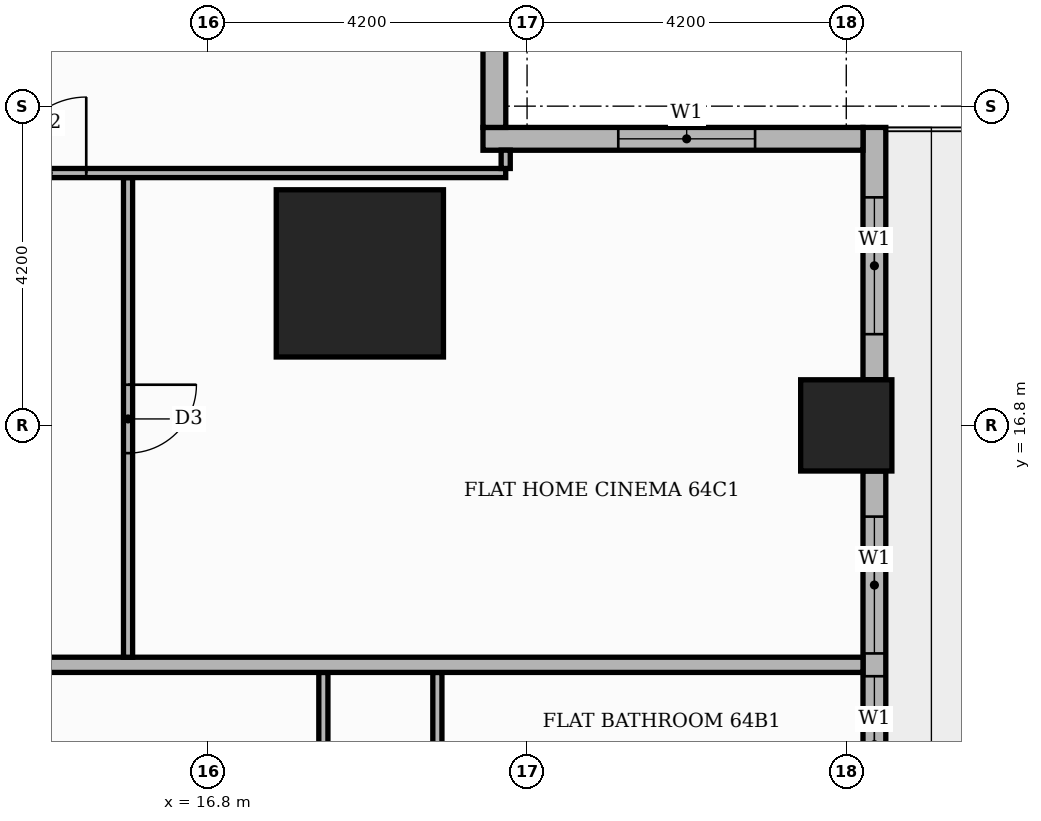
"""IFC4 building model, lengths in metres.
Left out: names, types, materials, properties, quantities, classifications, styles, units other than length and angle.
Written with IfcOpenShell. Run it as: python <this file> out.ifc"""

import sys

from ifc_helpers import new_model, si_unit, direction, frame, frame_2d, origin, origin_2d, place, context, subcontext, project, spatial, rectangle, extrude, element, fill, save


model = new_model("IFC4")
c1 = context("Model", 3, precision=1e-05, world=origin(), true_north=direction((0.0, 1.0)))
c2 = subcontext(c1, "Body", "Model", "MODEL_VIEW")
j1 = project(units=[si_unit("LENGTHUNIT", "METRE"), si_unit("PLANEANGLEUNIT", "RADIAN")], contexts=[c1])
p1 = place(None, origin())
s1 = spatial("IfcSite", under=j1, at=p1, CompositionType="ELEMENT")
p2 = place(p1, origin())
s2 = spatial("IfcBuilding", under=s1, at=p2, CompositionType="ELEMENT")
p3 = place(p2, frame((0.0, 0.0, 267.9)))
s3 = spatial("IfcBuildingStorey", under=s2, at=p3, CompositionType="ELEMENT", Elevation=267.9)
p4 = place(p3, frame((18.8, 18.8, 0.0), z_axis=(0.0, 0.0, 1.0), x_axis=(1.0, 0.0, 0.0)))
e1 = element("IfcColumn", 1, at=p4, inside=s3, PredefinedType="COLUMN", context=c2, shape_type="SweptSolid", body=[
    extrude(rectangle(XDim=2.2, YDim=2.2, at=origin_2d()), origin(), (0.0, 0.0, 1.0), 3.9),
])
p5 = place(p3, frame((25.2, 16.8, 0.0), z_axis=(0.0, 0.0, 1.0), x_axis=(1.0, 0.0, 0.0)))
e2 = element("IfcColumn", 2, at=p5, inside=s3, PredefinedType="COLUMN", context=c2, shape_type="SweptSolid", body=[
    extrude(rectangle(XDim=1.2, YDim=1.2, at=origin_2d()), origin(), (0.0, 0.0, 1.0), 3.9),
])
p6 = place(p3, frame((25.57, 9.0, 0.0), z_axis=(0.0, 0.0, 1.0), x_axis=(0.0, 1.0, 0.0)))
e3 = element("IfcWall", 3, at=p6, inside=s3, PredefinedType="STANDARD", context=c2, shape_type="SweptSolid", body=[
    extrude(rectangle(XDim=7.2, YDim=0.3, at=frame_2d((3.6, 0.0))), origin(), (0.0, 0.0, 1.0), 3.48),
])
p7 = place(p6, frame((0.6, 0.0, 0.9)))
e4 = element("IfcOpeningElement", 4, at=p7, cuts=e3, PredefinedType="OPENING", context=c2, shape_type="SweptSolid", body=[
    extrude(rectangle(XDim=1.8, YDim=2.1, at=frame_2d((0.9, 1.05))), frame((0.0, 0.16, 0.0), z_axis=(0.0, -1.0, 0.0), x_axis=(1.0, 0.0, 0.0)), (0.0, 0.0, 1.0), 0.32),
])
p8 = place(p6, frame((2.7, 0.0, 0.9)))
e5 = element("IfcOpeningElement", 5, at=p8, cuts=e3, PredefinedType="OPENING", context=c2, shape_type="SweptSolid", body=[
    extrude(rectangle(XDim=1.8, YDim=2.1, at=frame_2d((0.9, 1.05))), frame((0.0, 0.16, 0.0), z_axis=(0.0, -1.0, 0.0), x_axis=(1.0, 0.0, 0.0)), (0.0, 0.0, 1.0), 0.32),
])
p9 = place(p6, frame((4.8, 0.0, 0.9)))
e6 = element("IfcOpeningElement", 6, at=p9, cuts=e3, PredefinedType="OPENING", context=c2, shape_type="SweptSolid", body=[
    extrude(rectangle(XDim=1.8, YDim=2.1, at=frame_2d((0.9, 1.05))), frame((0.0, 0.16, 0.0), z_axis=(0.0, -1.0, 0.0), x_axis=(1.0, 0.0, 0.0)), (0.0, 0.0, 1.0), 0.32),
])
p10 = place(p3, frame((25.57, 17.4, 0.0), z_axis=(0.0, 0.0, 1.0), x_axis=(0.0, 1.0, 0.0)))
e7 = element("IfcWall", 7, at=p10, inside=s3, PredefinedType="STANDARD", context=c2, shape_type="SweptSolid", body=[
    extrude(rectangle(XDim=3.32, YDim=0.3, at=frame_2d((1.66, 0.0))), origin(), (0.0, 0.0, 1.0), 3.48),
])
p11 = place(p10, frame((0.6, 0.0, 0.9)))
e8 = element("IfcOpeningElement", 8, at=p11, cuts=e7, PredefinedType="OPENING", context=c2, shape_type="SweptSolid", body=[
    extrude(rectangle(XDim=1.8, YDim=2.1, at=frame_2d((0.9, 1.05))), frame((0.0, 0.16, 0.0), z_axis=(0.0, -1.0, 0.0), x_axis=(1.0, 0.0, 0.0)), (0.0, 0.0, 1.0), 0.32),
])
p12 = place(p3, frame((25.42, 20.57, 0.0), z_axis=(0.0, 0.0, 1.0), x_axis=(-1.0, 0.0, 0.0)))
e9 = element("IfcWall", 9, at=p12, inside=s3, PredefinedType="STANDARD", context=c2, shape_type="SweptSolid", body=[
    extrude(rectangle(XDim=5.0, YDim=0.3, at=frame_2d((2.5, 0.0))), origin(), (0.0, 0.0, 1.0), 3.48),
])
p13 = place(p12, frame((1.42, 0.0, 0.9)))
e10 = element("IfcOpeningElement", 10, at=p13, cuts=e9, PredefinedType="OPENING", context=c2, shape_type="SweptSolid", body=[
    extrude(rectangle(XDim=1.8, YDim=2.1, at=frame_2d((0.9, 1.05))), frame((0.0, 0.16, 0.0), z_axis=(0.0, -1.0, 0.0), x_axis=(1.0, 0.0, 0.0)), (0.0, 0.0, 1.0), 0.32),
])
p14 = place(p3, frame((20.57, 20.72, 0.0), z_axis=(0.0, 0.0, 1.0), x_axis=(0.0, 1.0, 0.0)))
e11 = element("IfcWall", 11, at=p14, inside=s3, PredefinedType="STANDARD", context=c2, shape_type="SweptSolid", body=[
    extrude(rectangle(XDim=5.0, YDim=0.3, at=frame_2d((2.5, 0.0))), origin(), (0.0, 0.0, 1.0), 3.48),
])
p15 = place(p14, frame((1.48, 0.0, 0.9)))
e12 = element("IfcOpeningElement", 12, at=p15, cuts=e11, PredefinedType="OPENING", context=c2, shape_type="SweptSolid", body=[
    extrude(rectangle(XDim=1.8, YDim=2.1, at=frame_2d((0.9, 1.05))), frame((0.0, 0.16, 0.0), z_axis=(0.0, -1.0, 0.0), x_axis=(1.0, 0.0, 0.0)), (0.0, 0.0, 1.0), 0.32),
])
p16 = place(p3, frame((18.32, 9.66, 0.0), z_axis=(0.0, 0.0, 1.0), x_axis=(0.0, 1.0, 0.0)))
e13 = element("IfcWall", 13, at=p16, inside=s3, PredefinedType="PARTITIONING", context=c2, shape_type="SweptSolid", body=[
    extrude(rectangle(XDim=3.89, YDim=0.12, at=frame_2d((1.945, 0.0))), origin(), (0.0, 0.0, 1.0), 3.48),
])
p17 = place(p16, frame((1.515, 0.0, 0.0)))
e14 = element("IfcOpeningElement", 14, at=p17, cuts=e13, PredefinedType="OPENING", context=c2, shape_type="SweptSolid", body=[
    extrude(rectangle(XDim=0.9, YDim=2.1, at=frame_2d((0.45, 1.05))), frame((0.0, 0.07, 0.0), z_axis=(0.0, -1.0, 0.0), x_axis=(1.0, 0.0, 0.0)), (0.0, 0.0, 1.0), 0.14),
])
p18 = place(p3, frame((19.82, 11.61, 0.0), z_axis=(0.0, 0.0, 1.0), x_axis=(0.0, 1.0, 0.0)))
e15 = element("IfcWall", 15, at=p18, inside=s3, PredefinedType="PARTITIONING", context=c2, shape_type="SweptSolid", body=[
    extrude(rectangle(XDim=1.94, YDim=0.12, at=frame_2d((0.97, 0.0))), origin(), (0.0, 0.0, 1.0), 3.48),
])
p19 = place(p3, frame((-13.65, 13.65, 0.0), z_axis=(0.0, 0.0, 1.0), x_axis=(1.0, 0.0, 0.0)))
e16 = element("IfcWall", 16, at=p19, inside=s3, PredefinedType="PARTITIONING", context=c2, shape_type="SweptSolid", body=[
    extrude(rectangle(XDim=39.07, YDim=0.2, at=frame_2d((19.535, 0.0))), origin(), (0.0, 0.0, 1.0), 3.48),
])
p20 = place(p19, frame((24.65, 0.0, 0.0)))
e17 = element("IfcOpeningElement", 17, at=p20, cuts=e16, PredefinedType="OPENING", context=c2, shape_type="SweptSolid", body=[
    extrude(rectangle(XDim=1.1, YDim=2.4, at=frame_2d((0.55, 1.2))), frame((0.0, 0.11, 0.0), z_axis=(0.0, -1.0, 0.0), x_axis=(1.0, 0.0, 0.0)), (0.0, 0.0, 1.0), 0.22),
])
p21 = place(p3, frame((15.75, 13.75, 0.0), z_axis=(0.0, 0.0, 1.0), x_axis=(0.0, 1.0, 0.0)))
e18 = element("IfcWall", 18, at=p21, inside=s3, PredefinedType="PARTITIONING", context=c2, shape_type="SweptSolid", body=[
    extrude(rectangle(XDim=6.31, YDim=0.12, at=frame_2d((3.155, 0.0))), origin(), (0.0, 0.0, 1.0), 3.48),
])
p22 = place(p21, frame((2.685, 0.0, 0.0)))
e19 = element("IfcOpeningElement", 19, at=p22, cuts=e18, PredefinedType="OPENING", context=c2, shape_type="SweptSolid", body=[
    extrude(rectangle(XDim=0.9, YDim=2.1, at=frame_2d((0.45, 1.05))), frame((0.0, 0.07, 0.0), z_axis=(0.0, -1.0, 0.0), x_axis=(1.0, 0.0, 0.0)), (0.0, 0.0, 1.0), 0.14),
])
p23 = place(p3, frame((-13.55, 20.12, 0.0), z_axis=(0.0, 0.0, 1.0), x_axis=(1.0, 0.0, 0.0)))
e20 = element("IfcWall", 20, at=p23, inside=s3, PredefinedType="PARTITIONING", context=c2, shape_type="SweptSolid", body=[
    extrude(rectangle(XDim=34.269, YDim=0.12, at=frame_2d((17.135, 0.0))), origin(), (0.0, 0.0, 1.0), 3.48),
])
p24 = place(p23, frame((27.75, 0.0, 0.0)))
e21 = element("IfcOpeningElement", 21, at=p24, cuts=e20, PredefinedType="OPENING", context=c2, shape_type="SweptSolid", body=[
    extrude(rectangle(XDim=1.0, YDim=2.1, at=frame_2d((0.5, 1.05))), frame((0.0, 0.07, 0.0), z_axis=(0.0, -1.0, 0.0), x_axis=(1.0, 0.0, 0.0)), (0.0, 0.0, 1.0), 0.14),
])
p25 = place(p23, frame((22.5, 0.0, 0.0)))
e22 = element("IfcOpeningElement", 22, at=p25, cuts=e20, PredefinedType="OPENING", context=c2, shape_type="SweptSolid", body=[
    extrude(rectangle(XDim=1.0, YDim=2.1, at=frame_2d((0.5, 1.05))), frame((0.0, 0.07, 0.0), z_axis=(0.0, -1.0, 0.0), x_axis=(1.0, 0.0, 0.0)), (0.0, 0.0, 1.0), 0.14),
])
p26 = place(p23, frame((14.15, 0.0, 0.0)))
e23 = element("IfcOpeningElement", 23, at=p26, cuts=e20, PredefinedType="OPENING", context=c2, shape_type="SweptSolid", body=[
    extrude(rectangle(XDim=0.9, YDim=2.1, at=frame_2d((0.45, 1.05))), frame((0.0, 0.07, 0.0), z_axis=(0.0, -1.0, 0.0), x_axis=(1.0, 0.0, 0.0)), (0.0, 0.0, 1.0), 0.14),
])
p27 = place(p23, frame((3.65, 0.0, 0.0)))
e24 = element("IfcOpeningElement", 24, at=p27, cuts=e20, PredefinedType="OPENING", context=c2, shape_type="SweptSolid", body=[
    extrude(rectangle(XDim=0.9, YDim=2.1, at=frame_2d((0.45, 1.05))), frame((0.0, 0.07, 0.0), z_axis=(0.0, -1.0, 0.0), x_axis=(1.0, 0.0, 0.0)), (0.0, 0.0, 1.0), 0.14),
])
p28 = place(p3, frame((20.719, 20.18, 0.0), z_axis=(0.0, 0.0, 1.0), x_axis=(0.0, 1.0, 0.0)))
e25 = element("IfcWall", 25, at=p28, inside=s3, PredefinedType="PARTITIONING", context=c2, shape_type="SweptSolid", body=[
    extrude(rectangle(XDim=0.241, YDim=0.12, at=frame_2d((0.121, 0.0))), origin(), (0.0, 0.0, 1.0), 3.48),
])
p29 = place(p8, origin())
e26 = element("IfcWindow", 26, at=p29, inside=s3, PartitioningType="SINGLE_PANEL", PredefinedType="WINDOW", context=c2, shape_type="SweptSolid", body=[
    extrude(rectangle(XDim=1.8, YDim=2.1, at=frame_2d((0.9, 1.05))), frame((0.0, 0.03, 0.0), z_axis=(0.0, -1.0, 0.0), x_axis=(1.0, 0.0, 0.0)), (0.0, 0.0, 1.0), 0.06),
])
fill(e5, e26)
p30 = place(p9, origin())
e27 = element("IfcWindow", 27, at=p30, inside=s3, PartitioningType="SINGLE_PANEL", PredefinedType="WINDOW", context=c2, shape_type="SweptSolid", body=[
    extrude(rectangle(XDim=1.8, YDim=2.1, at=frame_2d((0.9, 1.05))), frame((0.0, 0.03, 0.0), z_axis=(0.0, -1.0, 0.0), x_axis=(1.0, 0.0, 0.0)), (0.0, 0.0, 1.0), 0.06),
])
fill(e6, e27)
p31 = place(p11, origin())
e28 = element("IfcWindow", 28, at=p31, inside=s3, PartitioningType="SINGLE_PANEL", PredefinedType="WINDOW", context=c2, shape_type="SweptSolid", body=[
    extrude(rectangle(XDim=1.8, YDim=2.1, at=frame_2d((0.9, 1.05))), frame((0.0, 0.03, 0.0), z_axis=(0.0, -1.0, 0.0), x_axis=(1.0, 0.0, 0.0)), (0.0, 0.0, 1.0), 0.06),
])
fill(e8, e28)
p32 = place(p13, origin())
e29 = element("IfcWindow", 29, at=p32, inside=s3, PartitioningType="SINGLE_PANEL", PredefinedType="WINDOW", context=c2, shape_type="SweptSolid", body=[
    extrude(rectangle(XDim=1.8, YDim=2.1, at=frame_2d((0.9, 1.05))), frame((0.0, 0.03, 0.0), z_axis=(0.0, -1.0, 0.0), x_axis=(1.0, 0.0, 0.0)), (0.0, 0.0, 1.0), 0.06),
])
fill(e10, e29)
p33 = place(p22, frame((0.9, 0.0, 0.0), z_axis=(0.0, 0.0, 1.0), x_axis=(-1.0, 0.0, 0.0)))
e30 = element("IfcDoor", 30, at=p33, inside=s3, OperationType="SINGLE_SWING_RIGHT", PredefinedType="DOOR", context=c2, shape_type="SweptSolid", body=[
    extrude(rectangle(XDim=0.9, YDim=2.1, at=frame_2d((0.45, 1.05))), frame((0.0, 0.025, 0.0), z_axis=(0.0, -1.0, 0.0), x_axis=(1.0, 0.0, 0.0)), (0.0, 0.0, 1.0), 0.05),
])
fill(e19, e30)
p34 = place(p24, origin())
e31 = element("IfcDoor", 31, at=p34, inside=s3, OperationType="SINGLE_SWING_RIGHT", PredefinedType="DOOR", context=c2, shape_type="SweptSolid", body=[
    extrude(rectangle(XDim=1.0, YDim=2.1, at=frame_2d((0.5, 1.05))), frame((0.0, 0.025, 0.0), z_axis=(0.0, -1.0, 0.0), x_axis=(1.0, 0.0, 0.0)), (0.0, 0.0, 1.0), 0.05),
])
fill(e21, e31)
save(model, sys.argv[1])
